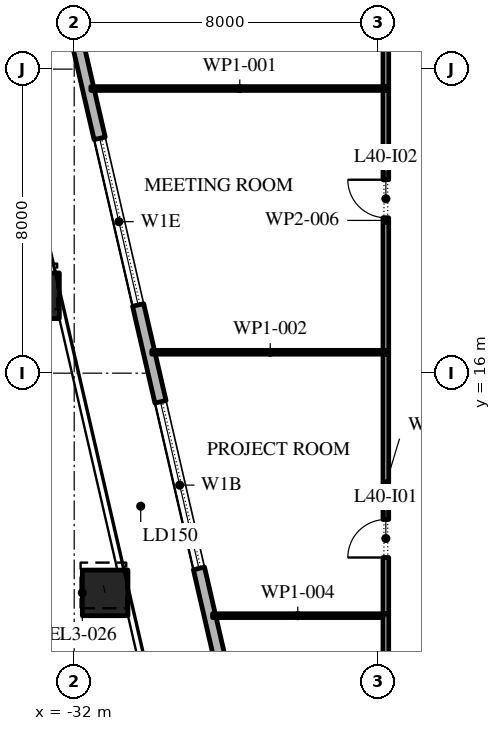
"""IFC4 building model, lengths in metres.
Left out: names, types, materials, properties, quantities, classifications, styles, units other than length and angle.
Written with IfcOpenShell. Run it as: python <this file> out.ifc"""

import sys

from ifc_helpers import new_model, si_unit, direction, frame, frame_2d, origin, origin_2d, place, context, subcontext, project, spatial, rectangle, extrude, element, fill, save


model = new_model("IFC4")
c1 = context("Model", 3, precision=1e-05, world=origin(), true_north=direction((0.0, 1.0)))
c2 = subcontext(c1, "Body", "Model", "MODEL_VIEW")
j1 = project(units=[si_unit("LENGTHUNIT", "METRE"), si_unit("PLANEANGLEUNIT", "RADIAN")], contexts=[c1])
p1 = place(None, origin())
s1 = spatial("IfcSite", under=j1, at=p1, CompositionType="ELEMENT")
p2 = place(p1, origin())
s2 = spatial("IfcBuilding", under=s1, at=p2, CompositionType="ELEMENT")
p3 = place(p2, frame((0.0, 0.0, 184.2)))
s3 = spatial("IfcBuildingStorey", under=s2, at=p3, CompositionType="ELEMENT", Elevation=184.2)
p4 = place(p3, frame((-32.991, 18.037, 0.0), z_axis=(-0.013461799865, 0.058373149415, 0.998204064995), x_axis=(-0.974423835271, -0.224718021653, 0.0)))
e1 = element("IfcColumn", 1, at=p4, inside=s3, PredefinedType="COLUMN", context=c2, shape_type="SweptSolid", body=[
    extrude(rectangle(XDim=1.2, YDim=1.2, at=origin_2d()), origin(), (0.0, 0.0, 1.0), 4.208),
])
p5 = place(p3, frame((-31.186, 10.219, 0.0), z_axis=(-0.010799619665, 0.046740289408, 0.998848694028), x_axis=(-0.974329962248, -0.225124686929, 0.0)))
e2 = element("IfcColumn", 2, at=p5, inside=s3, PredefinedType="COLUMN", context=c2, shape_type="SweptSolid", body=[
    extrude(rectangle(XDim=1.2, YDim=1.2, at=origin_2d()), origin(), (0.0, 0.0, 1.0), 4.205),
])
p6 = place(p3, frame((-33.157, 30.092, 0.0), z_axis=(0.0, 0.0, 1.0), x_axis=(0.224950279389, -0.974370243697, 0.0)))
e3 = element("IfcWall", 3, at=p6, inside=s3, PredefinedType="STANDARD", context=c2, shape_type="SweptSolid", body=[
    extrude(rectangle(XDim=49.5, YDim=0.3, at=frame_2d((24.75, 0.0))), origin(), (0.0, 0.0, 1.0), 4.0),
])
p7 = place(p6, frame((2.207, 0.0, 0.0)))
e4 = element("IfcOpeningElement", 4, at=p7, cuts=e3, PredefinedType="OPENING", context=c2, shape_type="SweptSolid", body=[
    extrude(rectangle(XDim=2.4, YDim=3.5, at=frame_2d((1.2, 1.75))), frame((0.0, 0.16, 0.0), z_axis=(0.0, -1.0, 0.0), x_axis=(1.0, 0.0, 0.0)), (0.0, 0.0, 1.0), 0.32),
])
p8 = place(p6, frame((8.121, 0.0, 0.45)))
e5 = element("IfcOpeningElement", 5, at=p8, cuts=e3, PredefinedType="OPENING", context=c2, shape_type="SweptSolid", body=[
    extrude(rectangle(XDim=4.5, YDim=2.825, at=frame_2d((2.25, 1.413))), frame((0.0, 0.16, 0.0), z_axis=(0.0, -1.0, 0.0), x_axis=(1.0, 0.0, 0.0)), (0.0, 0.0, 1.0), 0.32),
])
p9 = place(p6, frame((15.236, 0.0, 0.45)))
e6 = element("IfcOpeningElement", 6, at=p9, cuts=e3, PredefinedType="OPENING", context=c2, shape_type="SweptSolid", body=[
    extrude(rectangle(XDim=4.5, YDim=2.95, at=frame_2d((2.25, 1.475))), frame((0.0, 0.16, 0.0), z_axis=(0.0, -1.0, 0.0), x_axis=(1.0, 0.0, 0.0)), (0.0, 0.0, 1.0), 0.32),
])
p10 = place(p6, frame((22.35, 0.0, 0.45)))
e7 = element("IfcOpeningElement", 7, at=p10, cuts=e3, PredefinedType="OPENING", context=c2, shape_type="SweptSolid", body=[
    extrude(rectangle(XDim=4.5, YDim=3.0, at=frame_2d((2.25, 1.5))), frame((0.0, 0.16, 0.0), z_axis=(0.0, -1.0, 0.0), x_axis=(1.0, 0.0, 0.0)), (0.0, 0.0, 1.0), 0.32),
])
p11 = place(p6, frame((30.514, 0.0, 0.0)))
e8 = element("IfcOpeningElement", 8, at=p11, cuts=e3, PredefinedType="OPENING", context=c2, shape_type="SweptSolid", body=[
    extrude(rectangle(XDim=2.4, YDim=3.5, at=frame_2d((1.2, 1.75))), frame((0.0, 0.16, 0.0), z_axis=(0.0, -1.0, 0.0), x_axis=(1.0, 0.0, 0.0)), (0.0, 0.0, 1.0), 0.32),
])
p12 = place(p6, frame((36.579, 0.0, 0.45)))
e9 = element("IfcOpeningElement", 9, at=p12, cuts=e3, PredefinedType="OPENING", context=c2, shape_type="SweptSolid", body=[
    extrude(rectangle(XDim=4.5, YDim=3.05, at=frame_2d((2.25, 1.525))), frame((0.0, 0.16, 0.0), z_axis=(0.0, -1.0, 0.0), x_axis=(1.0, 0.0, 0.0)), (0.0, 0.0, 1.0), 0.32),
])
p13 = place(p6, frame((43.693, 0.0, 0.45)))
e10 = element("IfcOpeningElement", 10, at=p13, cuts=e3, PredefinedType="OPENING", context=c2, shape_type="SweptSolid", body=[
    extrude(rectangle(XDim=4.5, YDim=3.05, at=frame_2d((2.25, 1.525))), frame((0.0, 0.16, 0.0), z_axis=(0.0, -1.0, 0.0), x_axis=(1.0, 0.0, 0.0)), (0.0, 0.0, 1.0), 0.32),
])
p14 = place(p3, frame((-31.562, 23.49, 0.0), z_axis=(0.0, 0.0, 1.0), x_axis=(1.0, 0.0, 0.0)))
e11 = element("IfcWall", 11, at=p14, inside=s3, PredefinedType="PARTITIONING", context=c2, shape_type="SweptSolid", body=[
    extrude(rectangle(XDim=7.837, YDim=0.1, at=frame_2d((3.918, 0.0))), origin(), (0.0, 0.0, 1.0), 4.0),
])
p15 = place(p3, frame((-29.959, 16.55, 0.0), z_axis=(0.0, 0.0, 1.0), x_axis=(1.0, 0.0, 0.0)))
e12 = element("IfcWall", 12, at=p15, inside=s3, PredefinedType="PARTITIONING", context=c2, shape_type="SweptSolid", body=[
    extrude(rectangle(XDim=6.234, YDim=0.1, at=frame_2d((3.117, 0.0))), origin(), (0.0, 0.0, 1.0), 4.0),
])
p16 = place(p3, frame((-23.8, -5.075, 0.0), z_axis=(0.0, 0.0, 1.0), x_axis=(0.0, 1.0, 0.0)))
e13 = element("IfcWall", 13, at=p16, inside=s3, PredefinedType="PARTITIONING", context=c2, shape_type="SweptSolid", body=[
    extrude(rectangle(XDim=14.745, YDim=0.15, at=frame_2d((7.373, 0.0))), origin(), (0.0, 0.0, 1.0), 4.0),
])
p17 = place(p16, frame((5.545, 0.0, 0.0)))
e14 = element("IfcOpeningElement", 14, at=p17, cuts=e13, PredefinedType="OPENING", context=c2, shape_type="SweptSolid", body=[
    extrude(rectangle(XDim=1.0, YDim=2.1, at=frame_2d((0.5, 1.05))), frame((0.0, 0.085, 0.0), z_axis=(0.0, -1.0, 0.0), x_axis=(1.0, 0.0, 0.0)), (0.0, 0.0, 1.0), 0.17),
])
p18 = place(p3, frame((-23.875, 9.62, 0.0), z_axis=(0.0, 0.0, 1.0), x_axis=(-1.0, 0.0, 0.0)))
e15 = element("IfcWall", 15, at=p18, inside=s3, PredefinedType="PARTITIONING", context=c2, shape_type="SweptSolid", body=[
    extrude(rectangle(XDim=4.485, YDim=0.1, at=frame_2d((2.243, 0.0))), origin(), (0.0, 0.0, 1.0), 4.0),
])
p19 = place(p3, frame((-23.8, 9.67, 0.0), z_axis=(0.0, 0.0, 1.0), x_axis=(0.0, 1.0, 0.0)))
e16 = element("IfcWall", 16, at=p19, inside=s3, PredefinedType="PARTITIONING", context=c2, shape_type="SweptSolid", body=[
    extrude(rectangle(XDim=6.83, YDim=0.15, at=frame_2d((3.415, 0.0))), origin(), (0.0, 0.0, 1.0), 4.0),
])
p20 = place(p19, frame((1.48, 0.0, 0.0)))
e17 = element("IfcOpeningElement", 17, at=p20, cuts=e16, PredefinedType="OPENING", context=c2, shape_type="SweptSolid", body=[
    extrude(rectangle(XDim=1.0, YDim=2.1, at=frame_2d((0.5, 1.05))), frame((0.0, 0.085, 0.0), z_axis=(0.0, -1.0, 0.0), x_axis=(1.0, 0.0, 0.0)), (0.0, 0.0, 1.0), 0.17),
])
p21 = place(p3, frame((-23.8, 16.6, 0.0), z_axis=(0.0, 0.0, 1.0), x_axis=(0.0, 1.0, 0.0)))
e18 = element("IfcWall", 18, at=p21, inside=s3, PredefinedType="PARTITIONING", context=c2, shape_type="SweptSolid", body=[
    extrude(rectangle(XDim=6.84, YDim=0.15, at=frame_2d((3.42, 0.0))), origin(), (0.0, 0.0, 1.0), 4.0),
])
p22 = place(p21, frame((3.49, 0.0, 0.0)))
e19 = element("IfcOpeningElement", 19, at=p22, cuts=e18, PredefinedType="OPENING", context=c2, shape_type="SweptSolid", body=[
    extrude(rectangle(XDim=1.0, YDim=2.1, at=frame_2d((0.5, 1.05))), frame((0.0, 0.085, 0.0), z_axis=(0.0, -1.0, 0.0), x_axis=(1.0, 0.0, 0.0)), (0.0, 0.0, 1.0), 0.17),
])
p23 = place(p3, frame((-23.8, 23.54, 0.0), z_axis=(0.0, 0.0, 1.0), x_axis=(0.0, 1.0, 0.0)))
e20 = element("IfcWall", 20, at=p23, inside=s3, PredefinedType="PARTITIONING", context=c2, shape_type="SweptSolid", body=[
    extrude(rectangle(XDim=3.735, YDim=0.15, at=frame_2d((1.867, 0.0))), origin(), (0.0, 0.0, 1.0), 4.0),
])
p24 = place(p23, frame((2.01, 0.0, 0.0)))
e21 = element("IfcOpeningElement", 21, at=p24, cuts=e20, PredefinedType="OPENING", context=c2, shape_type="SweptSolid", body=[
    extrude(rectangle(XDim=1.0, YDim=2.1, at=frame_2d((0.5, 1.05))), frame((0.0, 0.085, 0.0), z_axis=(0.0, -1.0, 0.0), x_axis=(1.0, 0.0, 0.0)), (0.0, 0.0, 1.0), 0.17),
])
p25 = place(p8, origin())
e22 = element("IfcWindow", 22, at=p25, inside=s3, PartitioningType="DOUBLE_PANEL_VERTICAL", PredefinedType="WINDOW", context=c2, shape_type="SweptSolid", body=[
    extrude(rectangle(XDim=4.5, YDim=2.825, at=frame_2d((2.25, 1.413))), frame((0.0, 0.03, 0.0), z_axis=(0.0, -1.0, 0.0), x_axis=(1.0, 0.0, 0.0)), (0.0, 0.0, 1.0), 0.06),
])
fill(e5, e22)
p26 = place(p9, origin())
e23 = element("IfcWindow", 23, at=p26, inside=s3, PartitioningType="DOUBLE_PANEL_VERTICAL", PredefinedType="WINDOW", context=c2, shape_type="SweptSolid", body=[
    extrude(rectangle(XDim=4.5, YDim=2.95, at=frame_2d((2.25, 1.475))), frame((0.0, 0.03, 0.0), z_axis=(0.0, -1.0, 0.0), x_axis=(1.0, 0.0, 0.0)), (0.0, 0.0, 1.0), 0.06),
])
fill(e6, e23)
p27 = place(p20, origin())
e24 = element("IfcDoor", 24, at=p27, inside=s3, OperationType="SINGLE_SWING_RIGHT", PredefinedType="DOOR", context=c2, shape_type="SweptSolid", body=[
    extrude(rectangle(XDim=1.0, YDim=2.1, at=frame_2d((0.5, 1.05))), frame((0.0, 0.025, 0.0), z_axis=(0.0, -1.0, 0.0), x_axis=(1.0, 0.0, 0.0)), (0.0, 0.0, 1.0), 0.05),
])
fill(e17, e24)
p28 = place(p22, origin())
e25 = element("IfcDoor", 25, at=p28, inside=s3, OperationType="SINGLE_SWING_LEFT", PredefinedType="DOOR", context=c2, shape_type="SweptSolid", body=[
    extrude(rectangle(XDim=1.0, YDim=2.1, at=frame_2d((0.5, 1.05))), frame((0.0, 0.025, 0.0), z_axis=(0.0, -1.0, 0.0), x_axis=(1.0, 0.0, 0.0)), (0.0, 0.0, 1.0), 0.05),
])
fill(e19, e25)
save(model, sys.argv[1])
